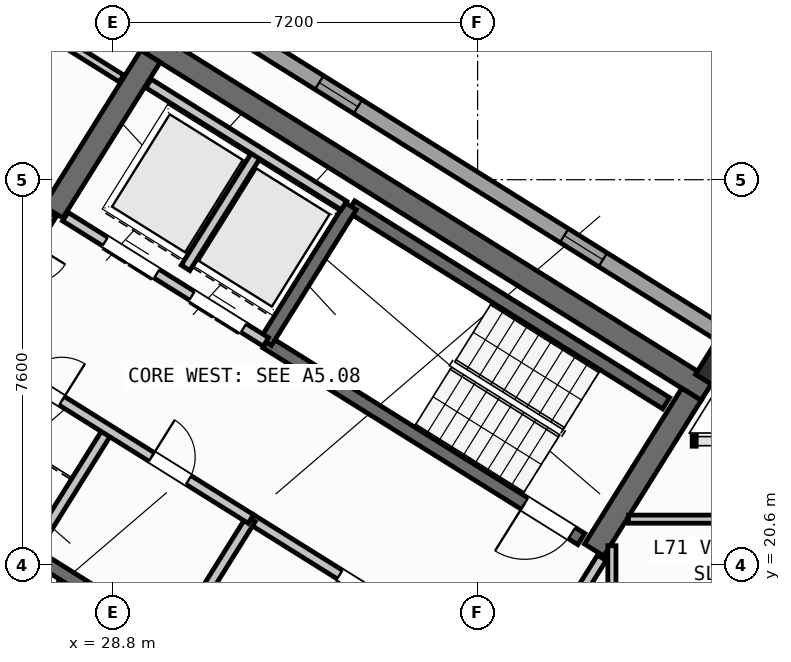
"""IFC4 building model, lengths in metres.
Left out: names, types, materials, properties, quantities, classifications, styles, units other than length and angle.
Written with IfcOpenShell. Run it as: python <this file> out.ifc"""

import sys

from ifc_helpers import new_model, si_unit, direction, frame, frame_2d, origin, origin_2d, place, context, subcontext, project, spatial, rectangle, hollow_rectangle, extrude, source, transform, mapped, element, fill, save


model = new_model("IFC4")
c1 = context("Model", 3, precision=1e-05, world=origin(), true_north=direction((0.0, 1.0)))
c2 = subcontext(c1, "Body", "Model", "MODEL_VIEW")
j1 = project(units=[si_unit("LENGTHUNIT", "METRE"), si_unit("PLANEANGLEUNIT", "RADIAN")], contexts=[c1])
p1 = place(None, origin())
s1 = spatial("IfcSite", under=j1, at=p1, CompositionType="ELEMENT")
p2 = place(p1, origin())
s2 = spatial("IfcBuilding", under=s1, at=p2, CompositionType="ELEMENT")
p3 = place(p2, frame((0.0, 0.0, 280.8)))
s3 = spatial("IfcBuildingStorey", under=s2, at=p3, CompositionType="ELEMENT", Elevation=280.8)
p4 = place(p3, frame((40.531, 24.036, 0.0), z_axis=(0.0, 0.0, 1.0), x_axis=(-0.848048787466, 0.529918157905, 0.0)))
e1 = element("IfcWall", 1, at=p4, inside=s3, PredefinedType="SHEAR", context=c2, shape_type="SweptSolid", body=[
    extrude(rectangle(XDim=13.04, YDim=0.45, at=frame_2d((6.52, 0.0))), origin(), (0.0, 0.0, 1.0), 3.35),
])
for number, where, z_axis, x_axis in (
    (2, (40.221, 23.965, 0.0), (0.0, 0.0, 1.0), (-0.53, -0.848, 0.0)),
    (3, (29.544, 30.636, 0.0), (0.0, 0.0, 1.0), (-0.53, -0.848, 0.0)),
):
    element("IfcWall", number, at=place(p3, frame(where, z_axis=z_axis, x_axis=x_axis)), inside=s3, PredefinedType="SHEAR", context=c2, shape_type="SweptSolid", body=[
        extrude(rectangle(XDim=3.625, YDim=0.45, at=frame_2d((1.812, 0.0))), origin(), (0.0, 0.0, 1.0), 3.35),
    ])
m1 = source(origin(), c2, "Body", "SweptSolid", [
    extrude(hollow_rectangle(XDim=0.7, YDim=0.7, WallThickness=0.028, at=origin_2d()), origin(), (0.0, 0.0, 1.0), 3.6),
])
p5 = place(p3, frame((40.783, 24.469, 0.0), z_axis=(0.0, 0.0, 1.0), x_axis=(-0.848048096156, 0.529919264233, 0.0)))
e4 = element("IfcColumn", 4, at=p5, inside=s3, PredefinedType="COLUMN", context=c2, shape_type="MappedRepresentation", body=[
    mapped(m1, transform((0.0, 0.0, 0.0), scale=1.0)),
])
p6 = place(p3, frame((19.566, 38.434, 0.0), z_axis=(0.0, 0.0, 1.0), x_axis=(0.84804567626, -0.529923136858, 0.0)))
e5 = element("IfcWall", 5, at=p6, inside=s3, PredefinedType="STANDARD", context=c2, shape_type="SweptSolid", body=[
    extrude(rectangle(XDim=25.188, YDim=0.32, at=frame_2d((12.594, 0.0))), origin(), (0.0, 0.0, 1.0), 3.35),
])
p7 = place(p6, frame((3.355, 0.0, 0.0)))
e6 = element("IfcOpeningElement", 6, at=p7, cuts=e5, PredefinedType="OPENING", context=c2, shape_type="SweptSolid", body=[
    extrude(rectangle(XDim=1.05, YDim=2.15, at=frame_2d((0.525, 1.075))), frame((0.0, 0.17, 0.0), z_axis=(0.0, -1.0, 0.0), x_axis=(1.0, 0.0, 0.0)), (0.0, 0.0, 1.0), 0.34),
])
p8 = place(p6, frame((0.939, 0.0, 0.9)))
e7 = element("IfcOpeningElement", 7, at=p8, cuts=e5, PredefinedType="OPENING", context=c2, shape_type="SweptSolid", body=[
    extrude(rectangle(XDim=1.65, YDim=1.45, at=frame_2d((0.825, 0.725))), frame((0.0, 0.17, 0.0), z_axis=(0.0, -1.0, 0.0), x_axis=(1.0, 0.0, 0.0)), (0.0, 0.0, 1.0), 0.34),
])
p9 = place(p6, frame((7.499, 0.0, 0.9)))
e8 = element("IfcOpeningElement", 8, at=p9, cuts=e5, PredefinedType="OPENING", context=c2, shape_type="SweptSolid", body=[
    extrude(rectangle(XDim=1.35, YDim=1.45, at=frame_2d((0.675, 0.725))), frame((0.0, 0.17, 0.0), z_axis=(0.0, -1.0, 0.0), x_axis=(1.0, 0.0, 0.0)), (0.0, 0.0, 1.0), 0.34),
])
p10 = place(p6, frame((10.754, 0.0, 1.0)))
e9 = element("IfcOpeningElement", 9, at=p10, cuts=e5, PredefinedType="OPENING", context=c2, shape_type="SweptSolid", body=[
    extrude(rectangle(XDim=0.9, YDim=1.25, at=frame_2d((0.45, 0.625))), frame((0.0, 0.17, 0.0), z_axis=(0.0, -1.0, 0.0), x_axis=(1.0, 0.0, 0.0)), (0.0, 0.0, 1.0), 0.34),
])
p11 = place(p6, frame((15.694, 0.0, 1.0)))
e10 = element("IfcOpeningElement", 10, at=p11, cuts=e5, PredefinedType="OPENING", context=c2, shape_type="SweptSolid", body=[
    extrude(rectangle(XDim=0.9, YDim=1.25, at=frame_2d((0.45, 0.625))), frame((0.0, 0.17, 0.0), z_axis=(0.0, -1.0, 0.0), x_axis=(1.0, 0.0, 0.0)), (0.0, 0.0, 1.0), 0.34),
])
p12 = place(p6, frame((21.394, 0.0, 1.0)))
e11 = element("IfcOpeningElement", 11, at=p12, cuts=e5, PredefinedType="OPENING", context=c2, shape_type="SweptSolid", body=[
    extrude(rectangle(XDim=0.9, YDim=1.25, at=frame_2d((0.45, 0.625))), frame((0.0, 0.17, 0.0), z_axis=(0.0, -1.0, 0.0), x_axis=(1.0, 0.0, 0.0)), (0.0, 0.0, 1.0), 0.34),
])
p13 = place(p3, frame((31.28, 18.261, 0.0), z_axis=(0.0, 0.0, 1.0), x_axis=(-0.848051618787, 0.529913626805, 0.0)))
e12 = element("IfcWall", 12, at=p13, inside=s3, PredefinedType="SHEAR", context=c2, shape_type="SweptSolid", body=[
    extrude(rectangle(XDim=7.46, YDim=0.26, at=frame_2d((3.73, 0.0))), origin(), (0.0, 0.0, 1.0), 3.35),
])
p14 = place(p13, frame((0.36, 0.0, 0.0)))
e13 = element("IfcOpeningElement", 13, at=p14, cuts=e12, PredefinedType="OPENING", context=c2, shape_type="SweptSolid", body=[
    extrude(rectangle(XDim=0.86, YDim=2.05, at=frame_2d((0.43, 1.025))), frame((0.0, 0.14, 0.0), z_axis=(0.0, -1.0, 0.0), x_axis=(1.0, 0.0, 0.0)), (0.0, 0.0, 1.0), 0.28),
])
p15 = place(p3, frame((39.721, 23.788, 0.0), z_axis=(0.0, 0.0, 1.0), x_axis=(-0.848054434086, 0.529909121291, 0.0)))
e14 = element("IfcWall", 14, at=p15, inside=s3, PredefinedType="SHEAR", context=c2, shape_type="SweptSolid", body=[
    extrude(rectangle(XDim=7.33, YDim=0.26, at=frame_2d((3.665, 0.0))), origin(), (0.0, 0.0, 1.0), 3.35),
])
p16 = place(p3, frame((38.046, 21.108, 0.0), z_axis=(0.0, 0.0, 1.0), x_axis=(-0.848054434086, 0.529909121291, 0.0)))
e15 = element("IfcWall", 15, at=p16, inside=s3, PredefinedType="SHEAR", context=c2, shape_type="SweptSolid", body=[
    extrude(rectangle(XDim=7.33, YDim=0.26, at=frame_2d((3.665, 0.0))), origin(), (0.0, 0.0, 1.0), 3.35),
])
p17 = place(p16, frame((0.22, 0.0, 0.0)))
e16 = element("IfcOpeningElement", 16, at=p17, cuts=e15, PredefinedType="OPENING", context=c2, shape_type="SweptSolid", body=[
    extrude(rectangle(XDim=1.1, YDim=2.1, at=frame_2d((0.55, 1.05))), frame((0.0, 0.14, 0.0), z_axis=(0.0, -1.0, 0.0), x_axis=(1.0, 0.0, 0.0)), (0.0, 0.0, 1.0), 0.28),
])
p18 = place(p3, frame((33.496, 27.677, 0.0), z_axis=(0.0, 0.0, 1.0), x_axis=(-0.529908658664, -0.84805472316, 0.0)))
e17 = element("IfcWall", 17, at=p18, inside=s3, PredefinedType="SHEAR", context=c2, shape_type="SweptSolid", body=[
    extrude(rectangle(XDim=3.16, YDim=0.26, at=frame_2d((1.58, 0.0))), origin(), (0.0, 0.0, 1.0), 3.35),
])
p19 = place(p3, frame((36.459, 18.421, 0.0), z_axis=(0.0, 0.0, 1.0), x_axis=(-0.848059591691, 0.529900867089, 0.0)))
e18 = element("IfcWall", 18, at=p19, inside=s3, PredefinedType="STANDARD", context=c2, shape_type="SweptSolid", body=[
    extrude(rectangle(XDim=5.818, YDim=0.2, at=frame_2d((2.909, 0.0))), origin(), (0.0, 0.0, 1.0), 3.34),
])
p20 = place(p19, frame((2.598, 0.0, 0.0)))
e19 = element("IfcOpeningElement", 19, at=p20, cuts=e18, PredefinedType="OPENING", context=c2, shape_type="SweptSolid", body=[
    extrude(rectangle(XDim=1.15, YDim=2.1, at=frame_2d((0.575, 1.05))), frame((0.0, 0.11, 0.0), z_axis=(0.0, -1.0, 0.0), x_axis=(1.0, 0.0, 0.0)), (0.0, 0.0, 1.0), 0.22),
])
p21 = place(p3, frame((31.822, 24.998, 0.0), z_axis=(0.0, 0.0, 1.0), x_axis=(-0.848054125777, 0.529909614701, 0.0)))
e20 = element("IfcWall", 20, at=p21, inside=s3, PredefinedType="STANDARD", context=c2, shape_type="SweptSolid", body=[
    extrude(rectangle(XDim=4.668, YDim=0.2, at=frame_2d((2.334, 0.0))), origin(), (0.0, 0.0, 1.0), 3.34),
])
p22 = place(p21, frame((0.52, 0.0, 0.0)))
e21 = element("IfcOpeningElement", 21, at=p22, cuts=e20, PredefinedType="OPENING", context=c2, shape_type="SweptSolid", body=[
    extrude(rectangle(XDim=1.2, YDim=2.15, at=frame_2d((0.6, 1.075))), frame((0.0, 0.11, 0.0), z_axis=(0.0, -1.0, 0.0), x_axis=(1.0, 0.0, 0.0)), (0.0, 0.0, 1.0), 0.22),
])
p23 = place(p21, frame((2.54, 0.0, 0.0)))
e22 = element("IfcOpeningElement", 22, at=p23, cuts=e20, PredefinedType="OPENING", context=c2, shape_type="SweptSolid", body=[
    extrude(rectangle(XDim=1.2, YDim=2.15, at=frame_2d((0.6, 1.075))), frame((0.0, 0.11, 0.0), z_axis=(0.0, -1.0, 0.0), x_axis=(1.0, 0.0, 0.0)), (0.0, 0.0, 1.0), 0.22),
])
p24 = place(p3, frame((31.645, 28.716, 0.0), z_axis=(0.0, 0.0, 1.0), x_axis=(-0.52986693015, -0.848080795876, 0.0)))
e23 = element("IfcWall", 23, at=p24, inside=s3, PredefinedType="STANDARD", context=c2, shape_type="SweptSolid", body=[
    extrude(rectangle(XDim=2.66, YDim=0.2, at=frame_2d((1.33, 0.0))), origin(), (0.0, 0.0, 1.0), 3.34),
])
p25 = place(p3, frame((33.363, 27.69, 0.0), z_axis=(0.0, 0.0, 1.0), x_axis=(-0.84804957148, 0.529916903215, 0.0)))
e24 = element("IfcWall", 24, at=p25, inside=s3, PredefinedType="STANDARD", context=c2, shape_type="SweptSolid", body=[
    extrude(rectangle(XDim=4.548, YDim=0.2, at=frame_2d((2.274, 0.0))), origin(), (0.0, 0.0, 1.0), 3.34),
])
for number, where, z_axis, x_axis in (
    (25, (31.525, 21.504, 0.0), (0.0, 0.0, 1.0), (-0.53, -0.848, 0.0)),
    (26, (28.71, 23.263, 0.0), (0.0, 0.0, 1.0), (-0.53, -0.848, 0.0)),
):
    element("IfcWall", number, at=place(p3, frame(where, z_axis=z_axis, x_axis=x_axis)), inside=s3, PredefinedType="STANDARD", context=c2, shape_type="SweptSolid", body=[
        extrude(rectangle(XDim=2.88, YDim=0.2, at=frame_2d((1.44, 0.0))), origin(), (0.0, 0.0, 1.0), 3.34),
    ])
p26 = place(p3, frame((31.525, 21.504, 0.0), z_axis=(0.0, 0.0, 1.0), x_axis=(-0.848042066329, 0.529928913853, 0.0)))
e27 = element("IfcWall", 27, at=p26, inside=s3, PredefinedType="STANDARD", context=c2, shape_type="SweptSolid", body=[
    extrude(rectangle(XDim=6.268, YDim=0.2, at=frame_2d((3.134, 0.0))), origin(), (0.0, 0.0, 1.0), 3.34),
])
p27 = place(p26, frame((4.4, 0.0, 0.0)))
e28 = element("IfcOpeningElement", 28, at=p27, cuts=e27, PredefinedType="OPENING", context=c2, shape_type="SweptSolid", body=[
    extrude(rectangle(XDim=0.86, YDim=2.05, at=frame_2d((0.43, 1.025))), frame((0.0, 0.11, 0.0), z_axis=(0.0, -1.0, 0.0), x_axis=(1.0, 0.0, 0.0)), (0.0, 0.0, 1.0), 0.22),
])
p28 = place(p26, frame((1.45, 0.0, 0.0)))
e29 = element("IfcOpeningElement", 29, at=p28, cuts=e27, PredefinedType="OPENING", context=c2, shape_type="SweptSolid", body=[
    extrude(rectangle(XDim=0.86, YDim=2.05, at=frame_2d((0.43, 1.025))), frame((0.0, 0.11, 0.0), z_axis=(0.0, -1.0, 0.0), x_axis=(1.0, 0.0, 0.0)), (0.0, 0.0, 1.0), 0.22),
])
p29 = place(p3, frame((27.596, 27.52, 0.0), z_axis=(0.0, 0.0, 1.0), x_axis=(-0.529865479138, -0.848081702443, 0.0)))
e30 = element("IfcWall", 30, at=p29, inside=s3, PredefinedType="STANDARD", context=c2, shape_type="SweptSolid", body=[
    extrude(rectangle(XDim=2.96, YDim=0.2, at=frame_2d((1.48, 0.0))), origin(), (0.0, 0.0, 1.0), 3.34),
])
p30 = place(p29, frame((0.7, 0.0, 0.0)))
e31 = element("IfcOpeningElement", 31, at=p30, cuts=e30, PredefinedType="OPENING", context=c2, shape_type="SweptSolid", body=[
    extrude(rectangle(XDim=1.5, YDim=2.15, at=frame_2d((0.75, 1.075))), frame((0.0, 0.11, 0.0), z_axis=(0.0, -1.0, 0.0), x_axis=(1.0, 0.0, 0.0)), (0.0, 0.0, 1.0), 0.22),
])
p31 = place(p3, frame((28.972, 30.198, 0.0), z_axis=(0.0, 0.0, 1.0), x_axis=(-0.848015752453, 0.529971021464, 0.0)))
e32 = element("IfcWall", 32, at=p31, inside=s3, PredefinedType="PARTITIONING", context=c2, shape_type="SweptSolid", body=[
    extrude(rectangle(XDim=2.358, YDim=0.16, at=frame_2d((1.179, 0.0))), origin(), (0.0, 0.0, 1.0), 3.34),
])
p32 = place(p3, frame((38.451, 20.737, 0.0), z_axis=(0.0, 0.0, 1.0), x_axis=(-0.529924799939, -0.848044637038, 0.0)))
e33 = element("IfcWall", 33, at=p32, inside=s3, PredefinedType="STANDARD", context=c2, shape_type="SweptSolid", body=[
    extrude(rectangle(XDim=2.96, YDim=0.2, at=frame_2d((1.48, 0.0))), origin(), (0.0, 0.0, 1.0), 3.34),
])
p33 = place(p32, frame((1.46, 0.0, 0.0)))
e34 = element("IfcOpeningElement", 34, at=p33, cuts=e33, PredefinedType="OPENING", context=c2, shape_type="SweptSolid", body=[
    extrude(rectangle(XDim=0.86, YDim=2.05, at=frame_2d((0.43, 1.025))), frame((0.0, 0.11, 0.0), z_axis=(0.0, -1.0, 0.0), x_axis=(1.0, 0.0, 0.0)), (0.0, 0.0, 1.0), 0.22),
])
p34 = place(p3, frame((38.65, 17.93, 0.0), z_axis=(0.0, 0.0, 1.0), x_axis=(0.0, 1.0, 0.0)))
e35 = element("IfcWall", 35, at=p34, inside=s3, PredefinedType="PARTITIONING", context=c2, shape_type="SweptSolid", body=[
    extrude(rectangle(XDim=3.046, YDim=0.16, at=frame_2d((1.523, 0.0))), origin(), (0.0, 0.0, 1.0), 3.34),
])
p35 = place(p3, frame((38.978, 21.5, 0.0), z_axis=(0.0, 0.0, 1.0), x_axis=(1.0, 0.0, 0.0)))
e36 = element("IfcWall", 36, at=p35, inside=s3, PredefinedType="PARTITIONING", context=c2, shape_type="SweptSolid", body=[
    extrude(rectangle(XDim=3.823, YDim=0.16, at=frame_2d((1.911, 0.0))), origin(), (0.0, 0.0, 1.0), 3.34),
])
m2 = source(origin(), c2, "Body", "SweptSolid", [
    extrude(rectangle(XDim=0.9, YDim=1.25, at=frame_2d((0.45, 0.625))), frame((0.0, 0.03, 0.0), z_axis=(0.0, -1.0, 0.0), x_axis=(1.0, 0.0, 0.0)), (0.0, 0.0, 1.0), 0.06),
])
p36 = place(p11, origin())
e37 = element("IfcWindow", 37, at=p36, inside=s3, PartitioningType="SINGLE_PANEL", PredefinedType="WINDOW", context=c2, shape_type="MappedRepresentation", body=[
    mapped(m2, transform((0.0, 0.0, 0.0), scale=1.0)),
])
fill(e10, e37)
p37 = place(p12, origin())
e38 = element("IfcWindow", 38, at=p37, inside=s3, PartitioningType="SINGLE_PANEL", PredefinedType="WINDOW", context=c2, shape_type="MappedRepresentation", body=[
    mapped(m2, transform((0.0, 0.0, 0.0), scale=1.0)),
])
fill(e11, e38)
m3 = source(origin(), c2, "Body", "SweptSolid", [
    extrude(rectangle(XDim=1.1, YDim=2.1, at=frame_2d((0.55, 1.05))), frame((0.0, 0.025, 0.0), z_axis=(0.0, -1.0, 0.0), x_axis=(1.0, 0.0, 0.0)), (0.0, 0.0, 1.0), 0.05),
])
p38 = place(p17, origin())
e39 = element("IfcDoor", 39, at=p38, inside=s3, OperationType="SINGLE_SWING_RIGHT", PredefinedType="DOOR", context=c2, shape_type="MappedRepresentation", body=[
    mapped(m3, transform((0.0, 0.0, 0.0), scale=1.0)),
])
fill(e16, e39)
m4 = source(origin(), c2, "Body", "SweptSolid", [
    extrude(rectangle(XDim=1.15, YDim=2.1, at=frame_2d((0.575, 1.05))), frame((0.0, 0.025, 0.0), z_axis=(0.0, -1.0, 0.0), x_axis=(1.0, 0.0, 0.0)), (0.0, 0.0, 1.0), 0.05),
])
p39 = place(p20, origin())
e40 = element("IfcDoor", 40, at=p39, inside=s3, OperationType="SINGLE_SWING_LEFT", PredefinedType="DOOR", context=c2, shape_type="MappedRepresentation", body=[
    mapped(m4, transform((0.0, 0.0, 0.0), scale=1.0)),
])
fill(e19, e40)
m5 = source(origin(), c2, "Body", "SweptSolid", [
    extrude(rectangle(XDim=1.2, YDim=2.15, at=frame_2d((0.6, 1.075))), frame((0.0, 0.025, 0.0), z_axis=(0.0, -1.0, 0.0), x_axis=(1.0, 0.0, 0.0)), (0.0, 0.0, 1.0), 0.05),
])
p40 = place(p22, origin())
e41 = element("IfcDoor", 41, at=p40, inside=s3, OperationType="DOUBLE_DOOR_SLIDING", PredefinedType="DOOR", context=c2, shape_type="MappedRepresentation", body=[
    mapped(m5, transform((0.0, 0.0, 0.0), scale=1.0)),
])
fill(e21, e41)
p41 = place(p23, origin())
e42 = element("IfcDoor", 42, at=p41, inside=s3, OperationType="DOUBLE_DOOR_SLIDING", PredefinedType="DOOR", context=c2, shape_type="MappedRepresentation", body=[
    mapped(m5, transform((0.0, 0.0, 0.0), scale=1.0)),
])
fill(e22, e42)
m6 = source(origin(), c2, "Body", "SweptSolid", [
    extrude(rectangle(XDim=0.86, YDim=2.05, at=frame_2d((0.43, 1.025))), frame((0.0, 0.025, 0.0), z_axis=(0.0, -1.0, 0.0), x_axis=(1.0, 0.0, 0.0)), (0.0, 0.0, 1.0), 0.05),
])
p42 = place(p27, frame((0.86, 0.0, 0.0), z_axis=(0.0, 0.0, 1.0), x_axis=(-1.0, 0.0, 0.0)))
e43 = element("IfcDoor", 43, at=p42, inside=s3, OperationType="SINGLE_SWING_RIGHT", PredefinedType="DOOR", context=c2, shape_type="MappedRepresentation", body=[
    mapped(m6, transform((0.0, 0.0, 0.0), scale=1.0)),
])
fill(e28, e43)
p43 = place(p28, frame((0.86, 0.0, 0.0), z_axis=(0.0, 0.0, 1.0), x_axis=(-1.0, 0.0, 0.0)))
e44 = element("IfcDoor", 44, at=p43, inside=s3, OperationType="SINGLE_SWING_LEFT", PredefinedType="DOOR", context=c2, shape_type="MappedRepresentation", body=[
    mapped(m6, transform((0.0, 0.0, 0.0), scale=1.0)),
])
fill(e29, e44)
save(model, sys.argv[1])
